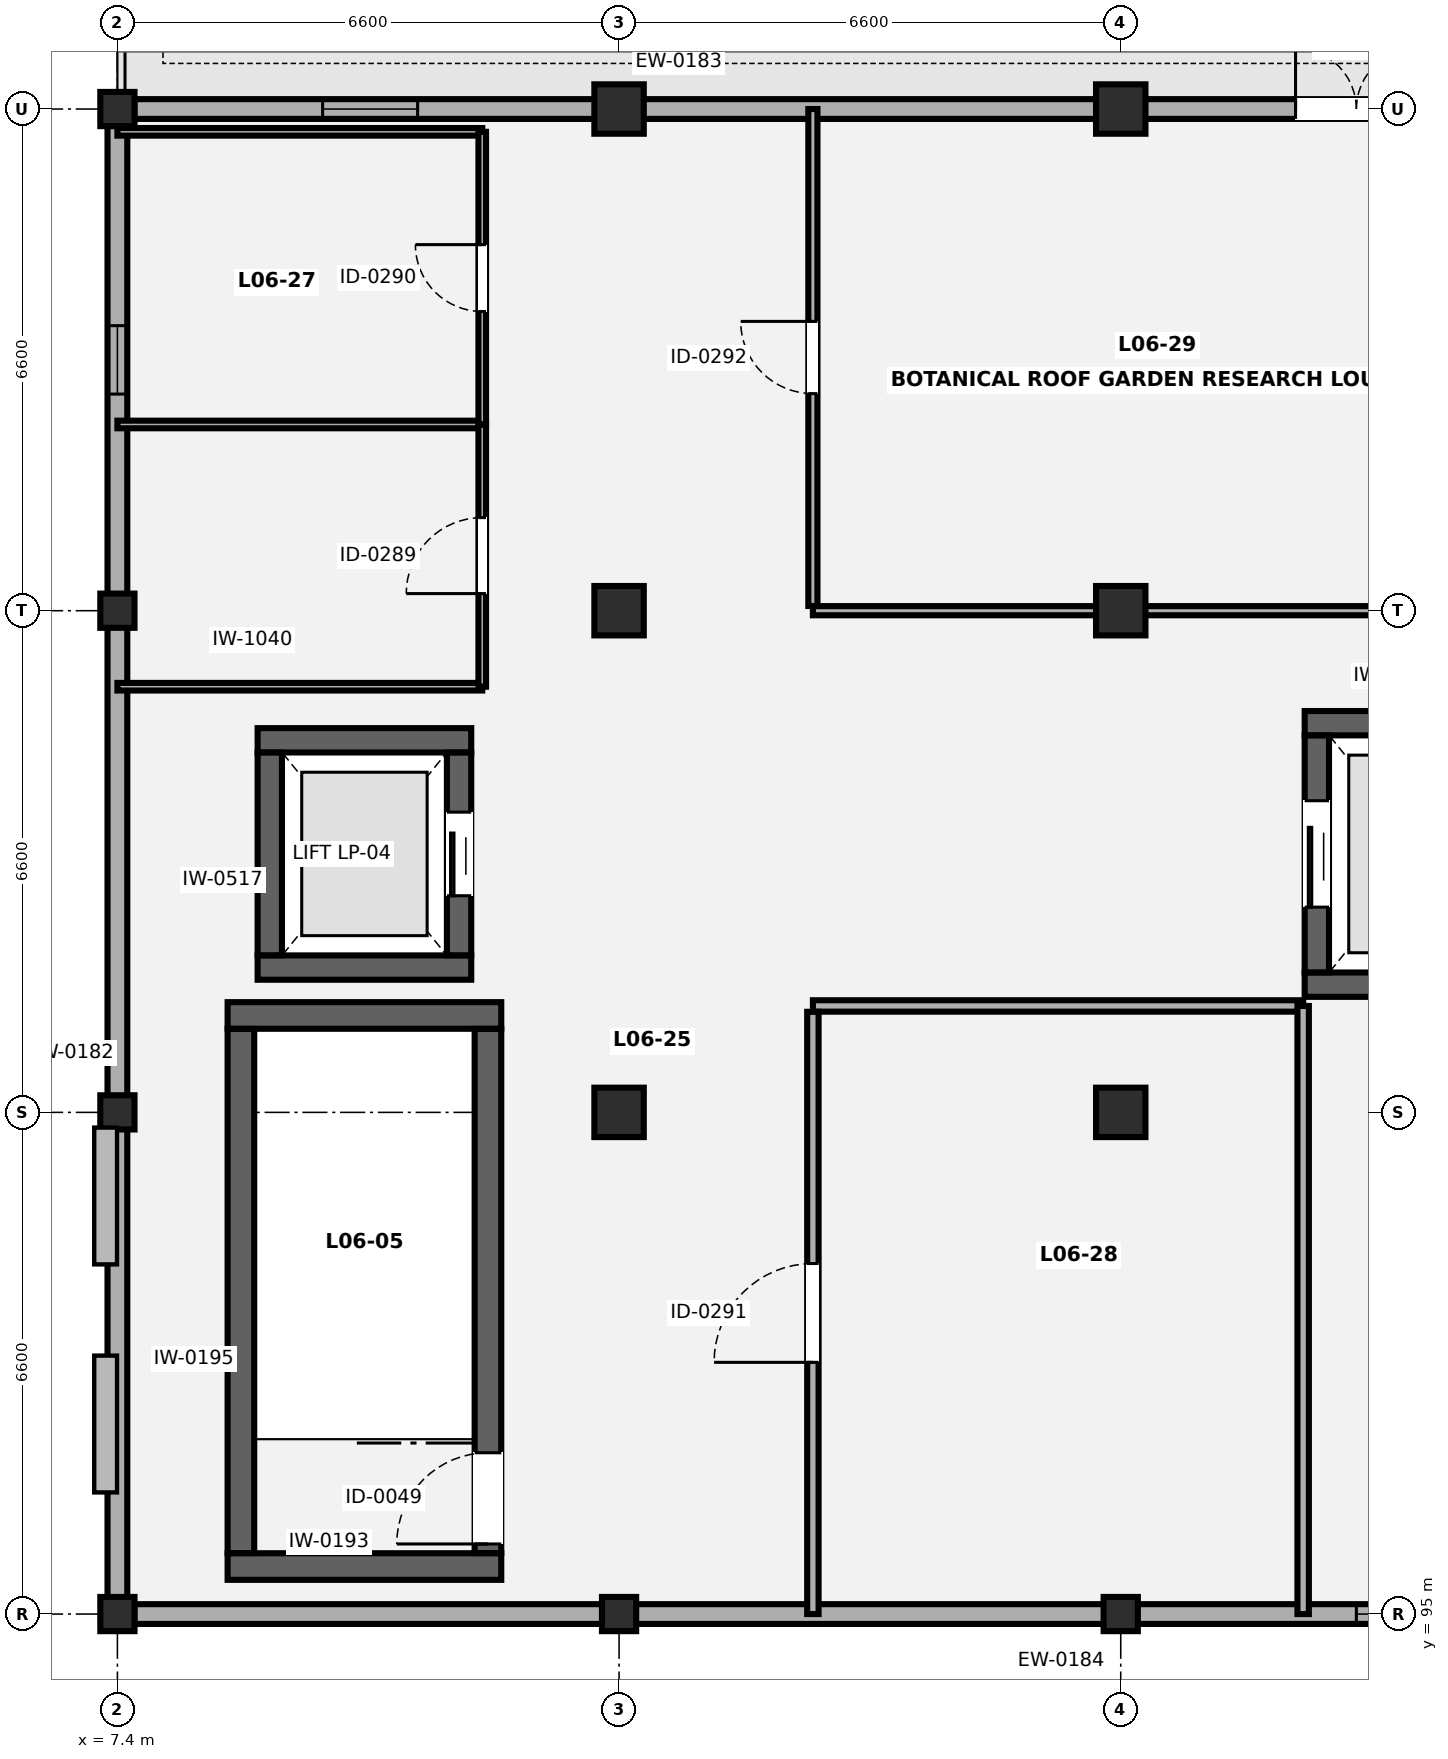
"""IFC4 building model, lengths in metres.
Left out: names, types, materials, properties, quantities, classifications, styles, units other than length and angle.
Written with IfcOpenShell. Run it as: python <this file> out.ifc"""

import sys

from ifc_helpers import new_model, si_unit, direction, frame, frame_2d, origin, origin_2d, place, context, subcontext, project, spatial, rectangle, extrude, element, fill, save


model = new_model("IFC4")
c1 = context("Model", 3, precision=1e-05, world=origin(), true_north=direction((0.0, 1.0)))
c2 = subcontext(c1, "Body", "Model", "MODEL_VIEW")
j1 = project(units=[si_unit("LENGTHUNIT", "METRE"), si_unit("PLANEANGLEUNIT", "RADIAN")], contexts=[c1])
p1 = place(None, origin())
s1 = spatial("IfcSite", under=j1, at=p1, CompositionType="ELEMENT")
p2 = place(p1, origin())
s2 = spatial("IfcBuilding", under=s1, at=p2, CompositionType="ELEMENT")
p3 = place(p2, frame((0.0, 0.0, 25.9)))
s3 = spatial("IfcBuildingStorey", under=s2, at=p3, CompositionType="ELEMENT", Elevation=25.9)
for number, where, z_axis, x_axis in (
    (1, (7.4, 95.0, 0.0), (0.0, 0.0, 1.0), (1.0, 0.0, 0.0)),
    (2, (7.4, 101.6, 0.0), (0.0, 0.0, 1.0), (1.0, 0.0, 0.0)),
    (3, (7.4, 108.2, 0.0), (0.0, 0.0, 1.0), (1.0, 0.0, 0.0)),
    (4, (7.4, 114.8, 0.0), (0.0, 0.0, 1.0), (1.0, 0.0, 0.0)),
    (5, (14.0, 95.0, 0.0), (0.0, 0.0, 1.0), (1.0, 0.0, 0.0)),
):
    element("IfcColumn", number, at=place(p3, frame(where, z_axis=z_axis, x_axis=x_axis)), inside=s3, PredefinedType="PILASTER", context=c2, shape_type="SweptSolid", body=[
        extrude(rectangle(XDim=0.45, YDim=0.45, at=origin_2d()), origin(), (0.0, 0.0, 1.0), 3.95),
    ])
for number, where, z_axis, x_axis in (
    (6, (14.0, 101.6, 0.0), (0.0, 0.0, 1.0), (1.0, 0.0, 0.0)),
    (7, (14.0, 108.2, 0.0), (0.0, 0.0, 1.0), (1.0, 0.0, 0.0)),
    (8, (14.0, 114.8, 0.0), (0.0, 0.0, 1.0), (1.0, 0.0, 0.0)),
):
    element("IfcColumn", number, at=place(p3, frame(where, z_axis=z_axis, x_axis=x_axis)), inside=s3, PredefinedType="COLUMN", context=c2, shape_type="SweptSolid", body=[
        extrude(rectangle(XDim=0.65, YDim=0.65, at=origin_2d()), origin(), (0.0, 0.0, 1.0), 3.95),
    ])
p4 = place(p3, frame((20.6, 95.0, 0.0), z_axis=(0.0, 0.0, 1.0), x_axis=(1.0, 0.0, 0.0)))
e9 = element("IfcColumn", 9, at=p4, inside=s3, PredefinedType="PILASTER", context=c2, shape_type="SweptSolid", body=[
    extrude(rectangle(XDim=0.45, YDim=0.45, at=origin_2d()), origin(), (0.0, 0.0, 1.0), 3.95),
])
for number, where, z_axis, x_axis in (
    (10, (20.6, 101.6, 0.0), (0.0, 0.0, 1.0), (1.0, 0.0, 0.0)),
    (11, (20.6, 108.2, 0.0), (0.0, 0.0, 1.0), (1.0, 0.0, 0.0)),
    (12, (20.6, 114.8, 0.0), (0.0, 0.0, 1.0), (1.0, 0.0, 0.0)),
):
    element("IfcColumn", number, at=place(p3, frame(where, z_axis=z_axis, x_axis=x_axis)), inside=s3, PredefinedType="COLUMN", context=c2, shape_type="SweptSolid", body=[
        extrude(rectangle(XDim=0.65, YDim=0.65, at=origin_2d()), origin(), (0.0, 0.0, 1.0), 3.95),
    ])
p5 = place(p3, frame((7.4, 95.223, 0.0), z_axis=(0.0, 0.0, 1.0), x_axis=(0.0, 1.0, 0.0)))
e13 = element("IfcWall", 13, at=p5, inside=s3, PredefinedType="SOLIDWALL", context=c2, shape_type="SweptSolid", body=[
    extrude(rectangle(XDim=19.354, YDim=0.26, at=frame_2d((9.677, 0.0))), origin(), (0.0, 0.0, 1.0), 2.885),
])
p6 = place(p5, frame((15.827, 0.0, 0.85)))
e14 = element("IfcOpeningElement", 14, at=p6, cuts=e13, PredefinedType="OPENING", context=c2, shape_type="SweptSolid", body=[
    extrude(rectangle(XDim=0.9, YDim=1.35, at=frame_2d((0.45, 0.675))), frame((0.0, 0.14, 0.0), z_axis=(0.0, -1.0, 0.0), x_axis=(1.0, 0.0, 0.0)), (0.0, 0.0, 1.0), 0.28),
])
p7 = place(p3, frame((7.623, 114.8, 0.0), z_axis=(0.0, 0.0, 1.0), x_axis=(1.0, 0.0, 0.0)))
e15 = element("IfcWall", 15, at=p7, inside=s3, PredefinedType="SOLIDWALL", context=c2, shape_type="SweptSolid", body=[
    extrude(rectangle(XDim=19.354, YDim=0.26, at=frame_2d((9.677, 0.0))), origin(), (0.0, 0.0, 1.0), 2.48),
])
p8 = place(p7, frame((15.277, 0.0, 0.0)))
e16 = element("IfcOpeningElement", 16, at=p8, cuts=e15, PredefinedType="OPENING", context=c2, shape_type="SweptSolid", body=[
    extrude(rectangle(XDim=1.6, YDim=2.15, at=frame_2d((0.8, 1.075))), frame((0.0, 0.14, 0.0), z_axis=(0.0, -1.0, 0.0), x_axis=(1.0, 0.0, 0.0)), (0.0, 0.0, 1.0), 0.28),
])
p9 = place(p7, frame((2.477, 0.0, 0.85)))
e17 = element("IfcOpeningElement", 17, at=p9, cuts=e15, PredefinedType="OPENING", context=c2, shape_type="SweptSolid", body=[
    extrude(rectangle(XDim=1.25, YDim=1.4, at=frame_2d((0.625, 0.7))), frame((0.0, 0.14, 0.0), z_axis=(0.0, -1.0, 0.0), x_axis=(1.0, 0.0, 0.0)), (0.0, 0.0, 1.0), 0.28),
])
p10 = place(p3, frame((26.977, 95.0, 0.0), z_axis=(0.0, 0.0, 1.0), x_axis=(-1.0, 0.0, 0.0)))
e18 = element("IfcWall", 18, at=p10, inside=s3, PredefinedType="SOLIDWALL", context=c2, shape_type="SweptSolid", body=[
    extrude(rectangle(XDim=19.354, YDim=0.26, at=frame_2d((9.677, 0.0))), origin(), (0.0, 0.0, 1.0), 2.48),
])
p11 = place(p10, frame((1.577, 0.0, 0.85)))
e19 = element("IfcOpeningElement", 19, at=p11, cuts=e18, PredefinedType="OPENING", context=c2, shape_type="SweptSolid", body=[
    extrude(rectangle(XDim=1.7, YDim=1.4, at=frame_2d((0.85, 0.7))), frame((0.0, 0.14, 0.0), z_axis=(0.0, -1.0, 0.0), x_axis=(1.0, 0.0, 0.0)), (0.0, 0.0, 1.0), 0.28),
])
for number, where, z_axis, x_axis in (
    (20, (8.85, 95.625, 0.0), (0.0, 0.0, 1.0), (1.0, 0.0, 0.0)),
    (21, (8.85, 102.875, 0.0), (0.0, 0.0, 1.0), (1.0, 0.0, 0.0)),
):
    element("IfcWall", number, at=place(p3, frame(where, z_axis=z_axis, x_axis=x_axis)), inside=s3, PredefinedType="SHEAR", context=c2, shape_type="SweptSolid", body=[
        extrude(rectangle(XDim=3.6, YDim=0.35, at=frame_2d((1.8, 0.0))), origin(), (0.0, 0.0, 1.0), 4.0),
    ])
p12 = place(p3, frame((9.025, 95.802, 0.0), z_axis=(0.0, 0.0, 1.0), x_axis=(0.0, 1.0, 0.0)))
e22 = element("IfcWall", 22, at=p12, inside=s3, PredefinedType="SHEAR", context=c2, shape_type="SweptSolid", body=[
    extrude(rectangle(XDim=6.896, YDim=0.35, at=frame_2d((3.448, 0.0))), origin(), (0.0, 0.0, 1.0), 4.0),
])
p13 = place(p3, frame((12.275, 95.802, 0.0), z_axis=(0.0, 0.0, 1.0), x_axis=(0.0, 1.0, 0.0)))
e23 = element("IfcWall", 23, at=p13, inside=s3, PredefinedType="SHEAR", context=c2, shape_type="SweptSolid", body=[
    extrude(rectangle(XDim=6.896, YDim=0.35, at=frame_2d((3.448, 0.0))), origin(), (0.0, 0.0, 1.0), 4.0),
])
p14 = place(p13, frame((0.12, 0.0, 0.0)))
e24 = element("IfcOpeningElement", 24, at=p14, cuts=e23, PredefinedType="OPENING", context=c2, shape_type="SweptSolid", body=[
    extrude(rectangle(XDim=1.2, YDim=2.15, at=frame_2d((0.6, 1.075))), frame((0.0, 0.185, 0.0), z_axis=(0.0, -1.0, 0.0), x_axis=(1.0, 0.0, 0.0)), (0.0, 0.0, 1.0), 0.37),
])
for number, where, z_axis, x_axis in (
    (25, (9.245, 103.505, 0.0), (0.0, 0.0, 1.0), (1.0, 0.0, 0.0)),
    (26, (9.245, 106.495, 0.0), (0.0, 0.0, 1.0), (1.0, 0.0, 0.0)),
):
    element("IfcWall", number, at=place(p3, frame(where, z_axis=z_axis, x_axis=x_axis)), inside=s3, PredefinedType="SHEAR", context=c2, shape_type="SweptSolid", body=[
        extrude(rectangle(XDim=2.81, YDim=0.32, at=frame_2d((1.405, 0.0))), origin(), (0.0, 0.0, 1.0), 4.0),
    ])
p15 = place(p3, frame((9.405, 103.667, 0.0), z_axis=(0.0, 0.0, 1.0), x_axis=(0.0, 1.0, 0.0)))
e27 = element("IfcWall", 27, at=p15, inside=s3, PredefinedType="SHEAR", context=c2, shape_type="SweptSolid", body=[
    extrude(rectangle(XDim=2.666, YDim=0.32, at=frame_2d((1.333, 0.0))), origin(), (0.0, 0.0, 1.0), 4.0),
])
p16 = place(p3, frame((11.895, 103.667, 0.0), z_axis=(0.0, 0.0, 1.0), x_axis=(0.0, 1.0, 0.0)))
e28 = element("IfcWall", 28, at=p16, inside=s3, PredefinedType="SHEAR", context=c2, shape_type="SweptSolid", body=[
    extrude(rectangle(XDim=2.666, YDim=0.32, at=frame_2d((1.333, 0.0))), origin(), (0.0, 0.0, 1.0), 4.0),
])
p17 = place(p16, frame((0.783, 0.0, 0.0)))
e29 = element("IfcOpeningElement", 29, at=p17, cuts=e28, PredefinedType="OPENING", context=c2, shape_type="SweptSolid", body=[
    extrude(rectangle(XDim=1.1, YDim=2.15, at=frame_2d((0.55, 1.075))), frame((0.0, 0.17, 0.0), z_axis=(0.0, -1.0, 0.0), x_axis=(1.0, 0.0, 0.0)), (0.0, 0.0, 1.0), 0.34),
])
for number, where, z_axis, x_axis in (
    (30, (23.02, 103.28, 0.0), (0.0, 0.0, 1.0), (1.0, 0.0, 0.0)),
    (31, (23.02, 106.72, 0.0), (0.0, 0.0, 1.0), (1.0, 0.0, 0.0)),
):
    element("IfcWall", number, at=place(p3, frame(where, z_axis=z_axis, x_axis=x_axis)), inside=s3, PredefinedType="SHEAR", context=c2, shape_type="SweptSolid", body=[
        extrude(rectangle(XDim=3.16, YDim=0.32, at=frame_2d((1.58, 0.0))), origin(), (0.0, 0.0, 1.0), 4.0),
    ])
p18 = place(p3, frame((23.18, 103.442, 0.0), z_axis=(0.0, 0.0, 1.0), x_axis=(0.0, 1.0, 0.0)))
e32 = element("IfcWall", 32, at=p18, inside=s3, PredefinedType="SHEAR", context=c2, shape_type="SweptSolid", body=[
    extrude(rectangle(XDim=3.116, YDim=0.32, at=frame_2d((1.558, 0.0))), origin(), (0.0, 0.0, 1.0), 4.0),
])
p19 = place(p18, frame((0.858, 0.0, 0.0)))
e33 = element("IfcOpeningElement", 33, at=p19, cuts=e32, PredefinedType="OPENING", context=c2, shape_type="SweptSolid", body=[
    extrude(rectangle(XDim=1.4, YDim=2.25, at=frame_2d((0.7, 1.125))), frame((0.0, 0.17, 0.0), z_axis=(0.0, -1.0, 0.0), x_axis=(1.0, 0.0, 0.0)), (0.0, 0.0, 1.0), 0.34),
])
for number, where, z_axis, x_axis in (
    (34, (7.4, 107.2, 0.0), (0.0, 0.0, 1.0), (1.0, 0.0, 0.0)),
    (35, (7.4, 110.65, 0.0), (0.0, 0.0, 1.0), (1.0, 0.0, 0.0)),
):
    element("IfcWall", number, at=place(p3, frame(where, z_axis=z_axis, x_axis=x_axis)), inside=s3, PredefinedType="PARTITIONING", context=c2, shape_type="SweptSolid", body=[
        extrude(rectangle(XDim=4.8, YDim=0.1, at=frame_2d((2.4, 0.0))), origin(), (0.0, 0.0, 1.0), 3.98),
    ])
p20 = place(p3, frame((12.2, 107.2, 0.0), z_axis=(0.0, 0.0, 1.0), x_axis=(0.0, 1.0, 0.0)))
e36 = element("IfcWall", 36, at=p20, inside=s3, PredefinedType="PARTITIONING", context=c2, shape_type="SweptSolid", body=[
    extrude(rectangle(XDim=3.45, YDim=0.1, at=frame_2d((1.725, 0.0))), origin(), (0.0, 0.0, 1.0), 3.98),
])
p21 = place(p20, frame((1.225, 0.0, 0.0)))
e37 = element("IfcOpeningElement", 37, at=p21, cuts=e36, PredefinedType="OPENING", context=c2, shape_type="SweptSolid", body=[
    extrude(rectangle(XDim=1.0, YDim=2.1, at=frame_2d((0.5, 1.05))), frame((0.0, 0.06, 0.0), z_axis=(0.0, -1.0, 0.0), x_axis=(1.0, 0.0, 0.0)), (0.0, 0.0, 1.0), 0.12),
])
p22 = place(p3, frame((7.4, 114.5, 0.0), z_axis=(0.0, 0.0, 1.0), x_axis=(1.0, 0.0, 0.0)))
e38 = element("IfcWall", 38, at=p22, inside=s3, PredefinedType="PARTITIONING", context=c2, shape_type="SweptSolid", body=[
    extrude(rectangle(XDim=4.8, YDim=0.1, at=frame_2d((2.4, 0.0))), origin(), (0.0, 0.0, 1.0), 2.435),
])
p23 = place(p3, frame((12.2, 110.652, 0.0), z_axis=(0.0, 0.0, 1.0), x_axis=(0.0, 1.0, 0.0)))
e39 = element("IfcWall", 39, at=p23, inside=s3, PredefinedType="PARTITIONING", context=c2, shape_type="SweptSolid", body=[
    extrude(rectangle(XDim=3.848, YDim=0.1, at=frame_2d((1.924, 0.0))), origin(), (0.0, 0.0, 1.0), 3.98),
])
p24 = place(p23, frame((1.484, 0.0, 0.0)))
e40 = element("IfcOpeningElement", 40, at=p24, cuts=e39, PredefinedType="OPENING", context=c2, shape_type="SweptSolid", body=[
    extrude(rectangle(XDim=0.88, YDim=2.08, at=frame_2d((0.44, 1.04))), frame((0.0, 0.06, 0.0), z_axis=(0.0, -1.0, 0.0), x_axis=(1.0, 0.0, 0.0)), (0.0, 0.0, 1.0), 0.12),
])
p25 = place(p3, frame((16.55, 103.0, 0.0), z_axis=(0.0, 0.0, 1.0), x_axis=(1.0, 0.0, 0.0)))
e41 = element("IfcWall", 41, at=p25, inside=s3, PredefinedType="PARTITIONING", context=c2, shape_type="SweptSolid", body=[
    extrude(rectangle(XDim=6.45, YDim=0.15, at=frame_2d((3.225, 0.0))), origin(), (0.0, 0.0, 1.0), 3.98),
])
p26 = place(p3, frame((16.55, 95.0, 0.0), z_axis=(0.0, 0.0, 1.0), x_axis=(0.0, 1.0, 0.0)))
e42 = element("IfcWall", 42, at=p26, inside=s3, PredefinedType="PARTITIONING", context=c2, shape_type="SweptSolid", body=[
    extrude(rectangle(XDim=7.923, YDim=0.15, at=frame_2d((3.961, 0.0))), origin(), (0.0, 0.0, 1.0), 3.98),
])
p27 = place(p26, frame((3.312, 0.0, 0.0)))
e43 = element("IfcOpeningElement", 43, at=p27, cuts=e42, PredefinedType="OPENING", context=c2, shape_type="SweptSolid", body=[
    extrude(rectangle(XDim=1.3, YDim=2.2, at=frame_2d((0.65, 1.1))), frame((0.0, 0.085, 0.0), z_axis=(0.0, -1.0, 0.0), x_axis=(1.0, 0.0, 0.0)), (0.0, 0.0, 1.0), 0.17),
])
p28 = place(p3, frame((23.0, 95.0, 0.0), z_axis=(0.0, 0.0, 1.0), x_axis=(0.0, 1.0, 0.0)))
e44 = element("IfcWall", 44, at=p28, inside=s3, PredefinedType="PARTITIONING", context=c2, shape_type="SweptSolid", body=[
    extrude(rectangle(XDim=8.0, YDim=0.15, at=frame_2d((4.0, 0.0))), origin(), (0.0, 0.0, 1.0), 3.98),
])
p29 = place(p3, frame((16.55, 108.2, 0.0), z_axis=(0.0, 0.0, 1.0), x_axis=(1.0, 0.0, 0.0)))
e45 = element("IfcWall", 45, at=p29, inside=s3, PredefinedType="PARTITIONING", context=c2, shape_type="SweptSolid", body=[
    extrude(rectangle(XDim=10.65, YDim=0.12, at=frame_2d((5.325, 0.0))), origin(), (0.0, 0.0, 1.0), 2.435),
])
p30 = place(p3, frame((16.55, 108.262, 0.0), z_axis=(0.0, 0.0, 1.0), x_axis=(0.0, 1.0, 0.0)))
e46 = element("IfcWall", 46, at=p30, inside=s3, PredefinedType="PARTITIONING", context=c2, shape_type="SweptSolid", body=[
    extrude(rectangle(XDim=6.538, YDim=0.12, at=frame_2d((3.269, 0.0))), origin(), (0.0, 0.0, 1.0), 3.98),
])
p31 = place(p30, frame((2.794, 0.0, 0.0)))
e47 = element("IfcOpeningElement", 47, at=p31, cuts=e46, PredefinedType="OPENING", context=c2, shape_type="SweptSolid", body=[
    extrude(rectangle(XDim=0.95, YDim=2.1, at=frame_2d((0.475, 1.05))), frame((0.0, 0.07, 0.0), z_axis=(0.0, -1.0, 0.0), x_axis=(1.0, 0.0, 0.0)), (0.0, 0.0, 1.0), 0.14),
])
p32 = place(p6, origin())
e48 = element("IfcWindow", 48, at=p32, inside=s3, PartitioningType="SINGLE_PANEL", PredefinedType="WINDOW", context=c2, shape_type="SweptSolid", body=[
    extrude(rectangle(XDim=0.9, YDim=1.35, at=frame_2d((0.45, 0.675))), frame((0.0, 0.03, 0.0), z_axis=(0.0, -1.0, 0.0), x_axis=(1.0, 0.0, 0.0)), (0.0, 0.0, 1.0), 0.06),
])
fill(e14, e48)
p33 = place(p8, origin())
e49 = element("IfcDoor", 49, at=p33, inside=s3, OperationType="DOUBLE_DOOR_SINGLE_SWING", PredefinedType="DOOR", context=c2, shape_type="SweptSolid", body=[
    extrude(rectangle(XDim=1.6, YDim=2.15, at=frame_2d((0.8, 1.075))), frame((0.0, 0.025, 0.0), z_axis=(0.0, -1.0, 0.0), x_axis=(1.0, 0.0, 0.0)), (0.0, 0.0, 1.0), 0.05),
])
fill(e16, e49)
p34 = place(p9, origin())
e50 = element("IfcWindow", 50, at=p34, inside=s3, PartitioningType="SINGLE_PANEL", PredefinedType="WINDOW", context=c2, shape_type="SweptSolid", body=[
    extrude(rectangle(XDim=1.25, YDim=1.4, at=frame_2d((0.625, 0.7))), frame((0.0, 0.03, 0.0), z_axis=(0.0, -1.0, 0.0), x_axis=(1.0, 0.0, 0.0)), (0.0, 0.0, 1.0), 0.06),
])
fill(e17, e50)
p35 = place(p11, origin())
e51 = element("IfcWindow", 51, at=p35, inside=s3, PartitioningType="SINGLE_PANEL", PredefinedType="WINDOW", context=c2, shape_type="SweptSolid", body=[
    extrude(rectangle(XDim=1.7, YDim=1.4, at=frame_2d((0.85, 0.7))), frame((0.0, 0.03, 0.0), z_axis=(0.0, -1.0, 0.0), x_axis=(1.0, 0.0, 0.0)), (0.0, 0.0, 1.0), 0.06),
])
fill(e19, e51)
p36 = place(p14, origin())
e52 = element("IfcDoor", 52, at=p36, inside=s3, OperationType="SINGLE_SWING_LEFT", PredefinedType="DOOR", context=c2, shape_type="SweptSolid", body=[
    extrude(rectangle(XDim=1.2, YDim=2.15, at=frame_2d((0.6, 1.075))), frame((0.0, 0.025, 0.0), z_axis=(0.0, -1.0, 0.0), x_axis=(1.0, 0.0, 0.0)), (0.0, 0.0, 1.0), 0.05),
])
fill(e24, e52)
p37 = place(p17, origin())
e53 = element("IfcDoor", 53, at=p37, inside=s3, OperationType="SLIDING_TO_LEFT", PredefinedType="DOOR", context=c2, shape_type="SweptSolid", body=[
    extrude(rectangle(XDim=1.1, YDim=2.15, at=frame_2d((0.55, 1.075))), frame((0.0, 0.025, 0.0), z_axis=(0.0, -1.0, 0.0), x_axis=(1.0, 0.0, 0.0)), (0.0, 0.0, 1.0), 0.05),
])
fill(e29, e53)
p38 = place(p19, origin())
e54 = element("IfcDoor", 54, at=p38, inside=s3, OperationType="DOUBLE_DOOR_SLIDING", PredefinedType="DOOR", context=c2, shape_type="SweptSolid", body=[
    extrude(rectangle(XDim=1.4, YDim=2.25, at=frame_2d((0.7, 1.125))), frame((0.0, 0.025, 0.0), z_axis=(0.0, -1.0, 0.0), x_axis=(1.0, 0.0, 0.0)), (0.0, 0.0, 1.0), 0.05),
])
fill(e33, e54)
p39 = place(p21, origin())
e55 = element("IfcDoor", 55, at=p39, inside=s3, OperationType="SINGLE_SWING_LEFT", PredefinedType="DOOR", context=c2, shape_type="SweptSolid", body=[
    extrude(rectangle(XDim=1.0, YDim=2.1, at=frame_2d((0.5, 1.05))), frame((0.0, 0.025, 0.0), z_axis=(0.0, -1.0, 0.0), x_axis=(1.0, 0.0, 0.0)), (0.0, 0.0, 1.0), 0.05),
])
fill(e37, e55)
p40 = place(p24, origin())
e56 = element("IfcDoor", 56, at=p40, inside=s3, OperationType="SINGLE_SWING_RIGHT", PredefinedType="DOOR", context=c2, shape_type="SweptSolid", body=[
    extrude(rectangle(XDim=0.88, YDim=2.08, at=frame_2d((0.44, 1.04))), frame((0.0, 0.025, 0.0), z_axis=(0.0, -1.0, 0.0), x_axis=(1.0, 0.0, 0.0)), (0.0, 0.0, 1.0), 0.05),
])
fill(e40, e56)
p41 = place(p27, origin())
e57 = element("IfcDoor", 57, at=p41, inside=s3, OperationType="SINGLE_SWING_LEFT", PredefinedType="DOOR", context=c2, shape_type="SweptSolid", body=[
    extrude(rectangle(XDim=1.3, YDim=2.2, at=frame_2d((0.65, 1.1))), frame((0.0, 0.025, 0.0), z_axis=(0.0, -1.0, 0.0), x_axis=(1.0, 0.0, 0.0)), (0.0, 0.0, 1.0), 0.05),
])
fill(e43, e57)
p42 = place(p31, origin())
e58 = element("IfcDoor", 58, at=p42, inside=s3, OperationType="SINGLE_SWING_RIGHT", PredefinedType="DOOR", context=c2, shape_type="SweptSolid", body=[
    extrude(rectangle(XDim=0.95, YDim=2.1, at=frame_2d((0.475, 1.05))), frame((0.0, 0.025, 0.0), z_axis=(0.0, -1.0, 0.0), x_axis=(1.0, 0.0, 0.0)), (0.0, 0.0, 1.0), 0.05),
])
fill(e47, e58)
save(model, sys.argv[1])
